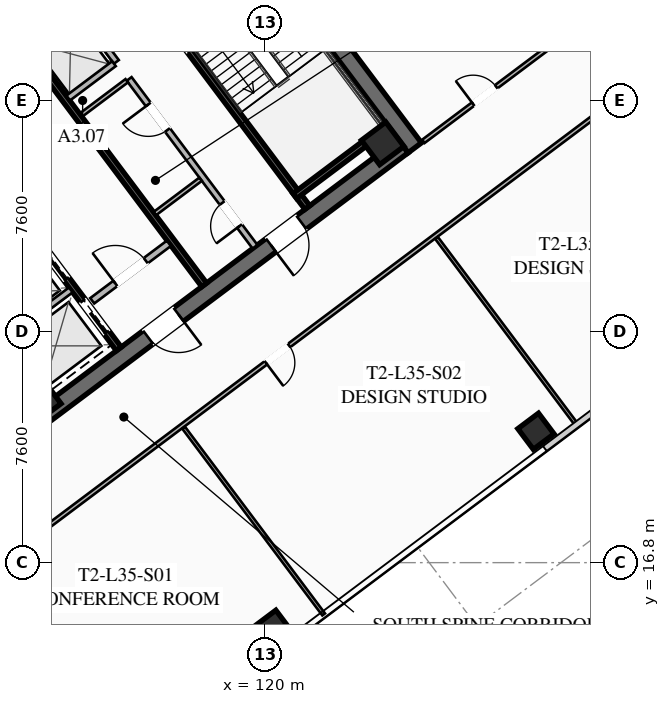
"""IFC4 building model, lengths in metres.
Left out: names, types, materials, properties, quantities, classifications, styles, units other than length and angle.
Written with IfcOpenShell. Run it as: python <this file> out.ifc"""

import sys

from ifc_helpers import new_model, si_unit, direction, frame, frame_2d, origin, origin_2d, place, context, subcontext, project, spatial, rectangle, hollow_rectangle, extrude, element, fill, save


model = new_model("IFC4")
c1 = context("Model", 3, precision=1e-05, world=origin(), true_north=direction((0.0, 1.0)))
c2 = subcontext(c1, "Body", "Model", "MODEL_VIEW")
j1 = project(units=[si_unit("LENGTHUNIT", "METRE"), si_unit("PLANEANGLEUNIT", "RADIAN")], contexts=[c1])
p1 = place(None, origin())
s1 = spatial("IfcSite", under=j1, at=p1, CompositionType="ELEMENT")
p2 = place(p1, origin())
s2 = spatial("IfcBuilding", under=s1, at=p2, CompositionType="ELEMENT")
p3 = place(p2, frame((0.0, 0.0, 132.15)))
s3 = spatial("IfcBuildingStorey", under=s2, at=p3, CompositionType="ELEMENT", Elevation=132.15)
p4 = place(p3, frame((115.564, 42.923, 0.0), z_axis=(0.0, 0.0, 1.0), x_axis=(0.600005007985, -0.799996243986, 0.0)))
e1 = element("IfcWall", 1, at=p4, inside=s3, PredefinedType="SHEAR", context=c2, shape_type="SweptSolid", body=[
    extrude(rectangle(XDim=15.6, YDim=0.55, at=frame_2d((7.8, 0.0))), origin(), (0.0, 0.0, 1.0), 3.55),
])
p5 = place(p3, frame((124.539, 30.498, 0.0), z_axis=(0.0, 0.0, 1.0), x_axis=(-0.799998054672, -0.600002593761, 0.0)))
e2 = element("IfcWall", 2, at=p5, inside=s3, PredefinedType="SHEAR", context=c2, shape_type="SweptSolid", body=[
    extrude(rectangle(XDim=15.06, YDim=0.55, at=frame_2d((7.53, 0.0))), origin(), (0.0, 0.0, 1.0), 3.55),
])
p6 = place(p5, frame((9.23, 0.0, 0.0)))
e3 = element("IfcOpeningElement", 3, at=p6, cuts=e2, PredefinedType="OPENING", context=c2, shape_type="SweptSolid", body=[
    extrude(rectangle(XDim=1.25, YDim=2.25, at=frame_2d((0.625, 1.125))), frame((0.0, 0.285, 0.0), z_axis=(0.0, -1.0, 0.0), x_axis=(1.0, 0.0, 0.0)), (0.0, 0.0, 1.0), 0.57),
])
p7 = place(p5, frame((4.18, 0.0, 0.0)))
e4 = element("IfcOpeningElement", 4, at=p7, cuts=e2, PredefinedType="OPENING", context=c2, shape_type="SweptSolid", body=[
    extrude(rectangle(XDim=1.25, YDim=2.25, at=frame_2d((0.625, 1.125))), frame((0.0, 0.285, 0.0), z_axis=(0.0, -1.0, 0.0), x_axis=(1.0, 0.0, 0.0)), (0.0, 0.0, 1.0), 0.57),
])
p8 = place(p3, frame((103.461, 33.502, 0.0), z_axis=(0.0, 0.0, 1.0), x_axis=(0.799998054672, 0.600002593761, 0.0)))
e5 = element("IfcWall", 5, at=p8, inside=s3, PredefinedType="SHEAR", context=c2, shape_type="SweptSolid", body=[
    extrude(rectangle(XDim=15.06, YDim=0.55, at=frame_2d((7.53, 0.0))), origin(), (0.0, 0.0, 1.0), 3.55),
])
p9 = place(p8, frame((4.58, 0.0, 0.0)))
e6 = element("IfcOpeningElement", 6, at=p9, cuts=e5, PredefinedType="OPENING", context=c2, shape_type="SweptSolid", body=[
    extrude(rectangle(XDim=1.25, YDim=2.25, at=frame_2d((0.625, 1.125))), frame((0.0, 0.285, 0.0), z_axis=(0.0, -1.0, 0.0), x_axis=(1.0, 0.0, 0.0)), (0.0, 0.0, 1.0), 0.57),
])
p10 = place(p8, frame((9.63, 0.0, 0.0)))
e7 = element("IfcOpeningElement", 7, at=p10, cuts=e5, PredefinedType="OPENING", context=c2, shape_type="SweptSolid", body=[
    extrude(rectangle(XDim=1.25, YDim=2.25, at=frame_2d((0.625, 1.125))), frame((0.0, 0.285, 0.0), z_axis=(0.0, -1.0, 0.0), x_axis=(1.0, 0.0, 0.0)), (0.0, 0.0, 1.0), 0.57),
])
for number, where, z_axis, x_axis in (
    (8, (112.59, 22.13, 0.0), (0.0, 0.0, 1.0), (0.8, 0.6, 0.0)),
    (9, (123.87, 30.59, 0.0), (0.0, 0.0, 1.0), (0.8, 0.6, 0.0)),
):
    element("IfcColumn", number, at=place(p3, frame(where, z_axis=z_axis, x_axis=x_axis)), inside=s3, PredefinedType="COLUMN", context=c2, shape_type="SweptSolid", body=[
        extrude(hollow_rectangle(XDim=1.0, YDim=1.0, WallThickness=0.04, at=origin_2d()), origin(), (0.0, 0.0, 1.0), 3.37),
    ])
for number, where, z_axis, x_axis in (
    (10, (120.27, 14.64, 0.0), (0.0, 0.0, 1.0), (0.8, 0.6, 0.0)),
    (11, (128.91, 21.12, 0.0), (0.0, 0.0, 1.0), (0.8, 0.6, 0.0)),
):
    element("IfcColumn", number, at=place(p3, frame(where, z_axis=z_axis, x_axis=x_axis)), inside=s3, PredefinedType="COLUMN", context=c2, shape_type="SweptSolid", body=[
        extrude(hollow_rectangle(XDim=0.85, YDim=0.85, WallThickness=0.035, at=origin_2d()), origin(), (0.0, 0.0, 1.0), 3.37),
    ])
p11 = place(p3, frame((116.56, 34.92, 0.0), z_axis=(0.0, 0.0, 1.0), x_axis=(0.59999029481, -0.8000072788, 0.0)))
e12 = element("IfcWall", 12, at=p11, inside=s3, PredefinedType="SHEAR", context=c2, shape_type="SweptSolid", body=[
    extrude(rectangle(XDim=8.05, YDim=0.2, at=frame_2d((4.025, 0.0))), origin(), (0.0, 0.0, 1.0), 3.37),
])
p12 = place(p11, frame((0.45, 0.0, 0.0)))
e13 = element("IfcOpeningElement", 13, at=p12, cuts=e12, PredefinedType="OPENING", context=c2, shape_type="SweptSolid", body=[
    extrude(rectangle(XDim=1.15, YDim=2.2, at=frame_2d((0.575, 1.1))), frame((0.0, 0.11, 0.0), z_axis=(0.0, -1.0, 0.0), x_axis=(1.0, 0.0, 0.0)), (0.0, 0.0, 1.0), 0.22),
])
p13 = place(p3, frame((120.98, 28.86, 0.0), z_axis=(0.0, 0.0, 1.0), x_axis=(0.800015298837, 0.599979601008, 0.0)))
e14 = element("IfcWall", 14, at=p13, inside=s3, PredefinedType="SHEAR", context=c2, shape_type="SweptSolid", body=[
    extrude(rectangle(XDim=3.83, YDim=0.2, at=frame_2d((1.915, 0.0))), origin(), (0.0, 0.0, 1.0), 3.37),
])
p14 = place(p3, frame((117.998, 25.936, 0.0), z_axis=(0.0, 0.0, 1.0), x_axis=(-0.600002693989, 0.799997979501, 0.0)))
e15 = element("IfcWall", 15, at=p14, inside=s3, PredefinedType="SHEAR", context=c2, shape_type="SweptSolid", body=[
    extrude(rectangle(XDim=14.5, YDim=0.2, at=frame_2d((7.25, 0.0))), origin(), (0.0, 0.0, 1.0), 3.37),
])
p15 = place(p3, frame((114.316, 25.412, 0.0), z_axis=(0.0, 0.0, 1.0), x_axis=(0.800018601094, 0.59997519774, 0.0)))
e16 = element("IfcWall", 16, at=p15, inside=s3, PredefinedType="SOLIDWALL", context=c2, shape_type="SweptSolid", body=[
    extrude(rectangle(XDim=3.15, YDim=0.22, at=frame_2d((1.575, 0.0))), origin(), (0.0, 0.0, 1.0), 2.723),
])
p16 = place(p15, frame((0.95, 0.0, 0.0)))
e17 = element("IfcOpeningElement", 17, at=p16, cuts=e16, PredefinedType="OPENING", context=c2, shape_type="SweptSolid", body=[
    extrude(rectangle(XDim=1.25, YDim=2.25, at=frame_2d((0.625, 1.125))), frame((0.0, 0.12, 0.0), z_axis=(0.0, -1.0, 0.0), x_axis=(1.0, 0.0, 0.0)), (0.0, 0.0, 1.0), 0.24),
])
p17 = place(p3, frame((115.19, 23.83, 0.0), z_axis=(0.0, 0.0, 1.0), x_axis=(-0.599993943644, 0.800004542231, 0.0)))
e18 = element("IfcWall", 18, at=p17, inside=s3, PredefinedType="SHEAR", context=c2, shape_type="SweptSolid", body=[
    extrude(rectangle(XDim=6.45, YDim=0.2, at=frame_2d((3.225, 0.0))), origin(), (0.0, 0.0, 1.0), 3.37),
])
p18 = place(p17, frame((4.875, 0.0, 0.0)))
e19 = element("IfcOpeningElement", 19, at=p18, cuts=e18, PredefinedType="OPENING", context=c2, shape_type="SweptSolid", body=[
    extrude(rectangle(XDim=1.3, YDim=2.25, at=frame_2d((0.65, 1.125))), frame((0.0, 0.11, 0.0), z_axis=(0.0, -1.0, 0.0), x_axis=(1.0, 0.0, 0.0)), (0.0, 0.0, 1.0), 0.22),
])
p19 = place(p17, frame((2.875, 0.0, 0.0)))
e20 = element("IfcOpeningElement", 20, at=p19, cuts=e18, PredefinedType="OPENING", context=c2, shape_type="SweptSolid", body=[
    extrude(rectangle(XDim=1.3, YDim=2.25, at=frame_2d((0.65, 1.125))), frame((0.0, 0.11, 0.0), z_axis=(0.0, -1.0, 0.0), x_axis=(1.0, 0.0, 0.0)), (0.0, 0.0, 1.0), 0.22),
])
p20 = place(p17, frame((0.675, 0.0, 0.0)))
e21 = element("IfcOpeningElement", 21, at=p20, cuts=e18, PredefinedType="OPENING", context=c2, shape_type="SweptSolid", body=[
    extrude(rectangle(XDim=1.3, YDim=2.25, at=frame_2d((0.65, 1.125))), frame((0.0, 0.11, 0.0), z_axis=(0.0, -1.0, 0.0), x_axis=(1.0, 0.0, 0.0)), (0.0, 0.0, 1.0), 0.22),
])
p21 = place(p3, frame((110.826, 23.682, 0.0), z_axis=(0.0, 0.0, 1.0), x_axis=(0.8, 0.6, 0.0)))
e22 = element("IfcWall", 22, at=p21, inside=s3, PredefinedType="SOLIDWALL", context=c2, shape_type="SweptSolid", body=[
    extrude(rectangle(XDim=3.48, YDim=0.2, at=frame_2d((1.74, 0.0))), origin(), (0.0, 0.0, 1.0), 3.37),
])
p22 = place(p3, frame((119.67, 27.19, 0.0), z_axis=(0.0, 0.0, 1.0), x_axis=(-0.599988677396, 0.800008491828, 0.0)))
e23 = element("IfcWall", 23, at=p22, inside=s3, PredefinedType="SOLIDWALL", context=c2, shape_type="SweptSolid", body=[
    extrude(rectangle(XDim=6.9, YDim=0.2, at=frame_2d((3.45, 0.0))), origin(), (0.0, 0.0, 1.0), 2.723),
])
p23 = place(p22, frame((0.85, 0.0, 0.0)))
e24 = element("IfcOpeningElement", 24, at=p23, cuts=e23, PredefinedType="OPENING", context=c2, shape_type="SweptSolid", body=[
    extrude(rectangle(XDim=0.95, YDim=2.05, at=frame_2d((0.475, 1.025))), frame((0.0, 0.11, 0.0), z_axis=(0.0, -1.0, 0.0), x_axis=(1.0, 0.0, 0.0)), (0.0, 0.0, 1.0), 0.22),
])
p24 = place(p22, frame((4.8, 0.0, 0.0)))
e25 = element("IfcOpeningElement", 25, at=p24, cuts=e23, PredefinedType="OPENING", context=c2, shape_type="SweptSolid", body=[
    extrude(rectangle(XDim=1.05, YDim=2.2, at=frame_2d((0.525, 1.1))), frame((0.0, 0.11, 0.0), z_axis=(0.0, -1.0, 0.0), x_axis=(1.0, 0.0, 0.0)), (0.0, 0.0, 1.0), 0.22),
])
for number, where, z_axis, x_axis in (
    (26, (113.946, 31.522, 0.0), (0.0, 0.0, 1.0), (0.8, 0.6, 0.0)),
    (27, (116.376, 28.282, 0.0), (0.0, 0.0, 1.0), (0.8, 0.6, 0.0)),
):
    element("IfcWall", number, at=place(p3, frame(where, z_axis=z_axis, x_axis=x_axis)), inside=s3, PredefinedType="PARTITIONING", context=c2, shape_type="SweptSolid", body=[
        extrude(rectangle(XDim=1.88, YDim=0.135, at=frame_2d((0.94, 0.0))), origin(), (0.0, 0.0, 1.0), 2.723),
    ])
p25 = place(p3, frame((115.11, 33.27, 0.0), z_axis=(0.0, 0.0, 1.0), x_axis=(-0.600011322243, 0.799991508192, 0.0)))
e28 = element("IfcWall", 28, at=p25, inside=s3, PredefinedType="SOLIDWALL", context=c2, shape_type="SweptSolid", body=[
    extrude(rectangle(XDim=6.9, YDim=0.2, at=frame_2d((3.45, 0.0))), origin(), (0.0, 0.0, 1.0), 3.37),
])
p26 = place(p25, frame((0.575, 0.0, 0.0)))
e29 = element("IfcOpeningElement", 29, at=p26, cuts=e28, PredefinedType="OPENING", context=c2, shape_type="SweptSolid", body=[
    extrude(rectangle(XDim=1.1, YDim=2.2, at=frame_2d((0.55, 1.1))), frame((0.0, 0.11, 0.0), z_axis=(0.0, -1.0, 0.0), x_axis=(1.0, 0.0, 0.0)), (0.0, 0.0, 1.0), 0.22),
])
p27 = place(p25, frame((2.825, 0.0, 0.0)))
e30 = element("IfcOpeningElement", 30, at=p27, cuts=e28, PredefinedType="OPENING", context=c2, shape_type="SweptSolid", body=[
    extrude(rectangle(XDim=1.1, YDim=2.2, at=frame_2d((0.55, 1.1))), frame((0.0, 0.11, 0.0), z_axis=(0.0, -1.0, 0.0), x_axis=(1.0, 0.0, 0.0)), (0.0, 0.0, 1.0), 0.22),
])
p28 = place(p25, frame((5.075, 0.0, 0.0)))
e31 = element("IfcOpeningElement", 31, at=p28, cuts=e28, PredefinedType="OPENING", context=c2, shape_type="SweptSolid", body=[
    extrude(rectangle(XDim=1.1, YDim=2.2, at=frame_2d((0.55, 1.1))), frame((0.0, 0.11, 0.0), z_axis=(0.0, -1.0, 0.0), x_axis=(1.0, 0.0, 0.0)), (0.0, 0.0, 1.0), 0.22),
])
p29 = place(p3, frame((113.526, 32.082, 0.0), z_axis=(0.0, 0.0, 1.0), x_axis=(0.800046745961, 0.599937666993, 0.0)))
e32 = element("IfcWall", 32, at=p29, inside=s3, PredefinedType="SOLIDWALL", context=c2, shape_type="SweptSolid", body=[
    extrude(rectangle(XDim=1.88, YDim=0.2, at=frame_2d((0.94, 0.0))), origin(), (0.0, 0.0, 1.0), 3.37),
])
p30 = place(p3, frame((95.87, 30.09, 0.0), z_axis=(0.0, 0.0, 1.0), x_axis=(0.799997191971, 0.600003744021, 0.0)))
e33 = element("IfcWall", 33, at=p30, inside=s3, PredefinedType="PARTITIONING", context=c2, shape_type="SweptSolid", body=[
    extrude(rectangle(XDim=31.3, YDim=0.135, at=frame_2d((15.65, 0.0))), origin(), (0.0, 0.0, 1.0), 2.723),
])
p31 = place(p30, frame((0.3, 0.0, 0.0)))
e34 = element("IfcOpeningElement", 34, at=p31, cuts=e33, PredefinedType="OPENING", context=c2, shape_type="SweptSolid", body=[
    extrude(rectangle(XDim=0.95, YDim=2.05, at=frame_2d((0.475, 1.025))), frame((0.0, 0.077, 0.0), z_axis=(0.0, -1.0, 0.0), x_axis=(1.0, 0.0, 0.0)), (0.0, 0.0, 1.0), 0.155),
])
p32 = place(p30, frame((11.202, 0.0, 0.0)))
e35 = element("IfcOpeningElement", 35, at=p32, cuts=e33, PredefinedType="OPENING", context=c2, shape_type="SweptSolid", body=[
    extrude(rectangle(XDim=0.95, YDim=2.05, at=frame_2d((0.475, 1.025))), frame((0.0, 0.077, 0.0), z_axis=(0.0, -1.0, 0.0), x_axis=(1.0, 0.0, 0.0)), (0.0, 0.0, 1.0), 0.155),
])
p33 = place(p30, frame((15.474, 0.0, 0.0)))
e36 = element("IfcOpeningElement", 36, at=p33, cuts=e33, PredefinedType="OPENING", context=c2, shape_type="SweptSolid", body=[
    extrude(rectangle(XDim=0.95, YDim=2.05, at=frame_2d((0.475, 1.025))), frame((0.0, 0.077, 0.0), z_axis=(0.0, -1.0, 0.0), x_axis=(1.0, 0.0, 0.0)), (0.0, 0.0, 1.0), 0.155),
])
p34 = place(p30, frame((30.05, 0.0, 0.0)))
e37 = element("IfcOpeningElement", 37, at=p34, cuts=e33, PredefinedType="OPENING", context=c2, shape_type="SweptSolid", body=[
    extrude(rectangle(XDim=0.95, YDim=2.05, at=frame_2d((0.475, 1.025))), frame((0.0, 0.077, 0.0), z_axis=(0.0, -1.0, 0.0), x_axis=(1.0, 0.0, 0.0)), (0.0, 0.0, 1.0), 0.155),
])
p35 = place(p3, frame((132.832, 32.974, 0.0), z_axis=(0.0, 0.0, 1.0), x_axis=(-0.8, -0.6, 0.0)))
e38 = element("IfcWall", 38, at=p35, inside=s3, PredefinedType="PARTITIONING", context=c2, shape_type="SweptSolid", body=[
    extrude(rectangle(XDim=31.3, YDim=0.135, at=frame_2d((15.65, 0.0))), origin(), (0.0, 0.0, 1.0), 2.723),
])
p36 = place(p35, frame((29.97, 0.0, 0.0)))
e39 = element("IfcOpeningElement", 39, at=p36, cuts=e38, PredefinedType="OPENING", context=c2, shape_type="SweptSolid", body=[
    extrude(rectangle(XDim=0.95, YDim=2.05, at=frame_2d((0.475, 1.025))), frame((0.0, 0.077, 0.0), z_axis=(0.0, -1.0, 0.0), x_axis=(1.0, 0.0, 0.0)), (0.0, 0.0, 1.0), 0.155),
])
p37 = place(p35, frame((15.053, 0.0, 0.0)))
e40 = element("IfcOpeningElement", 40, at=p37, cuts=e38, PredefinedType="OPENING", context=c2, shape_type="SweptSolid", body=[
    extrude(rectangle(XDim=0.95, YDim=2.05, at=frame_2d((0.475, 1.025))), frame((0.0, 0.077, 0.0), z_axis=(0.0, -1.0, 0.0), x_axis=(1.0, 0.0, 0.0)), (0.0, 0.0, 1.0), 0.155),
])
p38 = place(p35, frame((0.38, 0.0, 0.0)))
e41 = element("IfcOpeningElement", 41, at=p38, cuts=e38, PredefinedType="OPENING", context=c2, shape_type="SweptSolid", body=[
    extrude(rectangle(XDim=0.95, YDim=2.05, at=frame_2d((0.475, 1.025))), frame((0.0, 0.077, 0.0), z_axis=(0.0, -1.0, 0.0), x_axis=(1.0, 0.0, 0.0)), (0.0, 0.0, 1.0), 0.155),
])
p39 = place(p3, frame((121.928, 15.096, 0.0), z_axis=(0.0, 0.0, 1.0), x_axis=(-0.5999898274, 0.800007629349, 0.0)))
e42 = element("IfcWall", 42, at=p39, inside=s3, PredefinedType="PARTITIONING", context=c2, shape_type="SweptSolid", body=[
    extrude(rectangle(XDim=7.68, YDim=0.11, at=frame_2d((3.84, 0.0))), origin(), (0.0, 0.0, 1.0), 2.723),
])
p40 = place(p3, frame((130.248, 21.336, 0.0), z_axis=(0.0, 0.0, 1.0), x_axis=(-0.600010172309, 0.799992370667, 0.0)))
e43 = element("IfcWall", 43, at=p40, inside=s3, PredefinedType="PARTITIONING", context=c2, shape_type="SweptSolid", body=[
    extrude(rectangle(XDim=7.68, YDim=0.11, at=frame_2d((3.84, 0.0))), origin(), (0.0, 0.0, 1.0), 2.723),
])
p41 = place(p3, frame((125.208, 30.656, 0.0), z_axis=(0.0, 0.0, 1.0), x_axis=(0.800005876956, 0.599992163979, 0.0)))
e44 = element("IfcWall", 44, at=p41, inside=s3, PredefinedType="PARTITIONING", context=c2, shape_type="SweptSolid", body=[
    extrude(rectangle(XDim=9.97, YDim=0.135, at=frame_2d((4.985, 0.0))), origin(), (0.0, 0.0, 1.0), 2.723),
])
p42 = place(p41, frame((2.045, 0.0, 0.0)))
e45 = element("IfcOpeningElement", 45, at=p42, cuts=e44, PredefinedType="OPENING", context=c2, shape_type="SweptSolid", body=[
    extrude(rectangle(XDim=0.95, YDim=2.05, at=frame_2d((0.475, 1.025))), frame((0.0, 0.077, 0.0), z_axis=(0.0, -1.0, 0.0), x_axis=(1.0, 0.0, 0.0)), (0.0, 0.0, 1.0), 0.155),
])
p43 = place(p6, origin())
e46 = element("IfcDoor", 46, at=p43, inside=s3, OperationType="SINGLE_SWING_LEFT", PredefinedType="DOOR", context=c2, shape_type="SweptSolid", body=[
    extrude(rectangle(XDim=1.25, YDim=2.25, at=frame_2d((0.625, 1.125))), frame((0.0, 0.025, 0.0), z_axis=(0.0, -1.0, 0.0), x_axis=(1.0, 0.0, 0.0)), (0.0, 0.0, 1.0), 0.05),
])
fill(e3, e46)
p44 = place(p7, origin())
e47 = element("IfcDoor", 47, at=p44, inside=s3, OperationType="SINGLE_SWING_RIGHT", PredefinedType="DOOR", context=c2, shape_type="SweptSolid", body=[
    extrude(rectangle(XDim=1.25, YDim=2.25, at=frame_2d((0.625, 1.125))), frame((0.0, 0.025, 0.0), z_axis=(0.0, -1.0, 0.0), x_axis=(1.0, 0.0, 0.0)), (0.0, 0.0, 1.0), 0.05),
])
fill(e4, e47)
p45 = place(p16, origin())
e48 = element("IfcDoor", 48, at=p45, inside=s3, OperationType="SINGLE_SWING_LEFT", PredefinedType="DOOR", context=c2, shape_type="SweptSolid", body=[
    extrude(rectangle(XDim=1.25, YDim=2.25, at=frame_2d((0.625, 1.125))), frame((0.0, 0.025, 0.0), z_axis=(0.0, -1.0, 0.0), x_axis=(1.0, 0.0, 0.0)), (0.0, 0.0, 1.0), 0.05),
])
fill(e17, e48)
p46 = place(p23, origin())
e49 = element("IfcDoor", 49, at=p46, inside=s3, OperationType="SINGLE_SWING_LEFT", PredefinedType="DOOR", context=c2, shape_type="SweptSolid", body=[
    extrude(rectangle(XDim=0.95, YDim=2.05, at=frame_2d((0.475, 1.025))), frame((0.0, 0.025, 0.0), z_axis=(0.0, -1.0, 0.0), x_axis=(1.0, 0.0, 0.0)), (0.0, 0.0, 1.0), 0.05),
])
fill(e24, e49)
p47 = place(p24, origin())
e50 = element("IfcDoor", 50, at=p47, inside=s3, OperationType="SINGLE_SWING_RIGHT", PredefinedType="DOOR", context=c2, shape_type="SweptSolid", body=[
    extrude(rectangle(XDim=1.05, YDim=2.2, at=frame_2d((0.525, 1.1))), frame((0.0, 0.025, 0.0), z_axis=(0.0, -1.0, 0.0), x_axis=(1.0, 0.0, 0.0)), (0.0, 0.0, 1.0), 0.05),
])
fill(e25, e50)
p48 = place(p37, origin())
e51 = element("IfcDoor", 51, at=p48, inside=s3, OperationType="SINGLE_SWING_RIGHT", PredefinedType="DOOR", context=c2, shape_type="SweptSolid", body=[
    extrude(rectangle(XDim=0.95, YDim=2.05, at=frame_2d((0.475, 1.025))), frame((0.0, 0.025, 0.0), z_axis=(0.0, -1.0, 0.0), x_axis=(1.0, 0.0, 0.0)), (0.0, 0.0, 1.0), 0.05),
])
fill(e40, e51)
p49 = place(p42, origin())
e52 = element("IfcDoor", 52, at=p49, inside=s3, OperationType="SINGLE_SWING_LEFT", PredefinedType="DOOR", context=c2, shape_type="SweptSolid", body=[
    extrude(rectangle(XDim=0.95, YDim=2.05, at=frame_2d((0.475, 1.025))), frame((0.0, 0.025, 0.0), z_axis=(0.0, -1.0, 0.0), x_axis=(1.0, 0.0, 0.0)), (0.0, 0.0, 1.0), 0.05),
])
fill(e45, e52)
p50 = place(p19, origin())
e53 = element("IfcDoor", 53, at=p50, inside=s3, OperationType="SLIDING_TO_LEFT", PredefinedType="DOOR", context=c2, shape_type="SweptSolid", body=[
    extrude(rectangle(XDim=1.3, YDim=2.25, at=frame_2d((0.65, 1.125))), frame((0.0, 0.025, 0.0), z_axis=(0.0, -1.0, 0.0), x_axis=(1.0, 0.0, 0.0)), (0.0, 0.0, 1.0), 0.05),
])
fill(e20, e53)
p51 = place(p20, origin())
e54 = element("IfcDoor", 54, at=p51, inside=s3, OperationType="SLIDING_TO_LEFT", PredefinedType="DOOR", context=c2, shape_type="SweptSolid", body=[
    extrude(rectangle(XDim=1.3, YDim=2.25, at=frame_2d((0.65, 1.125))), frame((0.0, 0.025, 0.0), z_axis=(0.0, -1.0, 0.0), x_axis=(1.0, 0.0, 0.0)), (0.0, 0.0, 1.0), 0.05),
])
fill(e21, e54)
save(model, sys.argv[1])
